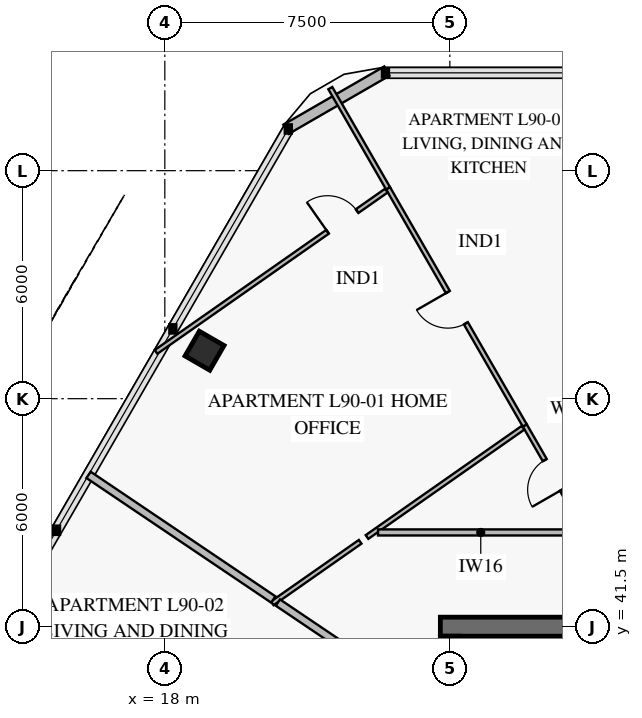
"""IFC4 building model, lengths in metres.
Left out: names, types, materials, properties, quantities, classifications, styles, units other than length and angle.
Written with IfcOpenShell. Run it as: python <this file> out.ifc"""

import sys

from ifc_helpers import new_model, si_unit, direction, frame, frame_2d, origin, origin_2d, place, context, subcontext, project, spatial, rectangle, extrude, element, fill, save


model = new_model("IFC4")
c1 = context("Model", 3, precision=1e-05, world=origin(), true_north=direction((0.0, 1.0)))
c2 = subcontext(c1, "Body", "Model", "MODEL_VIEW")
j1 = project(units=[si_unit("LENGTHUNIT", "METRE"), si_unit("PLANEANGLEUNIT", "RADIAN")], contexts=[c1])
p1 = place(None, origin())
s1 = spatial("IfcSite", under=j1, at=p1, CompositionType="ELEMENT")
p2 = place(p1, origin())
s2 = spatial("IfcBuilding", under=s1, at=p2, CompositionType="ELEMENT")
p3 = place(p2, frame((0.0, 0.0, 353.8)))
s3 = spatial("IfcBuildingStorey", under=s2, at=p3, CompositionType="ELEMENT", Elevation=353.8)
p4 = place(p3, frame((36.75, 41.5, 0.0), z_axis=(0.0, 0.0, 1.0), x_axis=(-1.0, 0.0, 0.0)))
e1 = element("IfcWall", 1, at=p4, inside=s3, PredefinedType="SHEAR", context=c2, shape_type="SweptSolid", body=[
    extrude(rectangle(XDim=11.5, YDim=0.5, at=frame_2d((5.75, 0.0))), origin(), (0.0, 0.0, 1.0), 3.8),
])
p5 = place(p4, frame((4.25, 0.0, 0.0)))
e2 = element("IfcOpeningElement", 2, at=p5, cuts=e1, PredefinedType="OPENING", context=c2, shape_type="SweptSolid", body=[
    extrude(rectangle(XDim=1.1, YDim=2.15, at=frame_2d((0.55, 1.075))), frame((0.0, 0.262, 0.0), z_axis=(0.0, -1.0, 0.0), x_axis=(1.0, 0.0, 0.0)), (0.0, 0.0, 1.0), 0.524),
])
p6 = place(p3, frame((25.5, 22.75, 0.0), z_axis=(0.0, 0.0, 1.0), x_axis=(0.0, 1.0, 0.0)))
e3 = element("IfcWall", 3, at=p6, inside=s3, PredefinedType="SHEAR", context=c2, shape_type="SweptSolid", body=[
    extrude(rectangle(XDim=18.5, YDim=0.5, at=frame_2d((9.25, 0.0))), origin(), (0.0, 0.0, 1.0), 3.8),
])
p7 = place(p6, frame((9.0, 0.0, 0.0)))
e4 = element("IfcOpeningElement", 4, at=p7, cuts=e3, PredefinedType="OPENING", context=c2, shape_type="SweptSolid", body=[
    extrude(rectangle(XDim=1.1, YDim=2.15, at=frame_2d((0.55, 1.075))), frame((0.0, 0.262, 0.0), z_axis=(0.0, -1.0, 0.0), x_axis=(1.0, 0.0, 0.0)), (0.0, 0.0, 1.0), 0.524),
])
p8 = place(p3, frame((19.045, 48.762, 0.0), z_axis=(0.0, 0.0, 1.0), x_axis=(-0.5, -0.866025403784, 0.0)))
e5 = element("IfcColumn", 5, at=p8, inside=s3, PredefinedType="COLUMN", context=c2, shape_type="SweptSolid", body=[
    extrude(rectangle(XDim=0.75, YDim=0.75, at=origin_2d()), origin(), (0.0, 0.0, 1.0), 3.35),
])
p9 = place(p3, frame((21.189, 54.589, 0.0), z_axis=(0.0, 0.0, 1.0), x_axis=(0.866023752521, 0.50000286006, 0.0)))
e6 = element("IfcWall", 6, at=p9, inside=s3, PredefinedType="SOLIDWALL", context=c2, shape_type="SweptSolid", body=[
    extrude(rectangle(XDim=3.065, YDim=0.28, at=frame_2d((1.532, 0.0))), origin(), (0.0, 0.0, 1.0), 3.35),
])
p10 = place(p3, frame((28.766, 44.55, 0.0), z_axis=(0.0, 0.0, 1.0), x_axis=(-0.499380083009, 0.866383017316, 0.0)))
e7 = element("IfcWall", 7, at=p10, inside=s3, PredefinedType="PARTITIONING", context=c2, shape_type="SweptSolid", body=[
    extrude(rectangle(XDim=2.593, YDim=0.12, at=frame_2d((1.296, 0.0))), origin(), (0.0, 0.0, 1.0), 3.35),
])
p11 = place(p10, frame((0.639, 0.0, 0.0)))
e8 = element("IfcOpeningElement", 8, at=p11, cuts=e7, PredefinedType="OPENING", context=c2, shape_type="SweptSolid", body=[
    extrude(rectangle(XDim=0.9, YDim=2.1, at=frame_2d((0.45, 1.05))), frame((0.0, 0.072, 0.0), z_axis=(0.0, -1.0, 0.0), x_axis=(1.0, 0.0, 0.0)), (0.0, 0.0, 1.0), 0.144),
])
p12 = place(p3, frame((27.471, 46.797, 0.0), z_axis=(0.0, 0.0, 1.0), x_axis=(-0.499402562398, 0.866370059888, 0.0)))
e9 = element("IfcWall", 9, at=p12, inside=s3, PredefinedType="PARTITIONING", context=c2, shape_type="SweptSolid", body=[
    extrude(rectangle(XDim=7.202, YDim=0.12, at=frame_2d((3.601, 0.0))), origin(), (0.0, 0.0, 1.0), 2.77),
])
p13 = place(p12, frame((3.101, 0.0, 0.0)))
e10 = element("IfcOpeningElement", 10, at=p13, cuts=e9, PredefinedType="OPENING", context=c2, shape_type="SweptSolid", body=[
    extrude(rectangle(XDim=0.95, YDim=2.1, at=frame_2d((0.475, 1.05))), frame((0.0, 0.072, 0.0), z_axis=(0.0, -1.0, 0.0), x_axis=(1.0, 0.0, 0.0)), (0.0, 0.0, 1.0), 0.144),
])
p14 = place(p3, frame((23.831, 52.976, 0.0), z_axis=(0.0, 0.0, 1.0), x_axis=(-0.819148211634, -0.573581909911, 0.0)))
e11 = element("IfcWall", 11, at=p14, inside=s3, PredefinedType="PARTITIONING", context=c2, shape_type="SweptSolid", body=[
    extrude(rectangle(XDim=7.4, YDim=0.12, at=frame_2d((3.7, 0.0))), origin(), (0.0, 0.0, 1.0), 2.922),
])
p15 = place(p14, frame((0.94, 0.0, 0.0)))
e12 = element("IfcOpeningElement", 12, at=p15, cuts=e11, PredefinedType="OPENING", context=c2, shape_type="SweptSolid", body=[
    extrude(rectangle(XDim=0.95, YDim=2.1, at=frame_2d((0.475, 1.05))), frame((0.0, 0.072, 0.0), z_axis=(0.0, -1.0, 0.0), x_axis=(1.0, 0.0, 0.0)), (0.0, 0.0, 1.0), 0.144),
])
p16 = place(p3, frame((23.874, 53.037, 0.0), z_axis=(0.0, 0.0, 1.0), x_axis=(-0.499419092817, 0.866360531032, 0.0)))
e13 = element("IfcWall", 13, at=p16, inside=s3, PredefinedType="PARTITIONING", context=c2, shape_type="SweptSolid", body=[
    extrude(rectangle(XDim=3.042, YDim=0.12, at=frame_2d((1.521, 0.0))), origin(), (0.0, 0.0, 1.0), 3.35),
])
p17 = place(p3, frame((27.427, 46.736, 0.0), z_axis=(0.0, 0.0, 1.0), x_axis=(-0.819165574648, -0.573557112511, 0.0)))
e14 = element("IfcWall", 14, at=p17, inside=s3, PredefinedType="PARTITIONING", context=c2, shape_type="SweptSolid", body=[
    extrude(rectangle(XDim=5.014, YDim=0.12, at=frame_2d((2.507, 0.0))), origin(), (0.0, 0.0, 1.0), 2.8),
])
p18 = place(p3, frame((23.14, 43.734, 0.0), z_axis=(0.0, 0.0, 1.0), x_axis=(-0.819170990497, -0.57354937741, 0.0)))
e15 = element("IfcWall", 15, at=p18, inside=s3, PredefinedType="PARTITIONING", context=c2, shape_type="SweptSolid", body=[
    extrude(rectangle(XDim=2.824, YDim=0.12, at=frame_2d((1.412, 0.0))), origin(), (0.0, 0.0, 1.0), 3.0),
])
p19 = place(p3, frame((23.056, 40.731, 0.0), z_axis=(0.0, 0.0, 1.0), x_axis=(-0.829030181168, 0.559203861497, 0.0)))
e16 = element("IfcWall", 16, at=p19, inside=s3, PredefinedType="PARTITIONING", context=c2, shape_type="SweptSolid", body=[
    extrude(rectangle(XDim=2.51, YDim=0.2, at=frame_2d((1.255, 0.0))), origin(), (0.0, 0.0, 1.0), 3.35),
])
p20 = place(p3, frame((20.854, 42.216, 0.0), z_axis=(0.0, 0.0, 1.0), x_axis=(-0.829040257145, 0.559188923382, 0.0)))
e17 = element("IfcWall", 17, at=p20, inside=s3, PredefinedType="PARTITIONING", context=c2, shape_type="SweptSolid", body=[
    extrude(rectangle(XDim=5.864, YDim=0.2, at=frame_2d((2.932, 0.0))), origin(), (0.0, 0.0, 1.0), 2.77),
])
p21 = place(p3, frame((29.016, 43.98, 0.0), z_axis=(0.0, 0.0, 1.0), x_axis=(-1.0, 0.0, 0.0)))
e18 = element("IfcWall", 18, at=p21, inside=s3, PredefinedType="PARTITIONING", context=c2, shape_type="SweptSolid", body=[
    extrude(rectangle(XDim=5.406, YDim=0.16, at=frame_2d((2.703, 0.0))), origin(), (0.0, 0.0, 1.0), 2.8),
])
p22 = place(p11, origin())
e19 = element("IfcDoor", 19, at=p22, inside=s3, OperationType="SINGLE_SWING_LEFT", PredefinedType="DOOR", context=c2, shape_type="SweptSolid", body=[
    extrude(rectangle(XDim=0.9, YDim=2.1, at=frame_2d((0.45, 1.05))), frame((0.0, 0.025, 0.0), z_axis=(0.0, -1.0, 0.0), x_axis=(1.0, 0.0, 0.0)), (0.0, 0.0, 1.0), 0.05),
])
fill(e8, e19)
p23 = place(p13, origin())
e20 = element("IfcDoor", 20, at=p23, inside=s3, OperationType="SINGLE_SWING_RIGHT", PredefinedType="DOOR", context=c2, shape_type="SweptSolid", body=[
    extrude(rectangle(XDim=0.95, YDim=2.1, at=frame_2d((0.475, 1.05))), frame((0.0, 0.025, 0.0), z_axis=(0.0, -1.0, 0.0), x_axis=(1.0, 0.0, 0.0)), (0.0, 0.0, 1.0), 0.05),
])
fill(e10, e20)
p24 = place(p15, frame((0.95, 0.0, 0.0), z_axis=(0.0, 0.0, 1.0), x_axis=(-1.0, 0.0, 0.0)))
e21 = element("IfcDoor", 21, at=p24, inside=s3, OperationType="SINGLE_SWING_LEFT", PredefinedType="DOOR", context=c2, shape_type="SweptSolid", body=[
    extrude(rectangle(XDim=0.95, YDim=2.1, at=frame_2d((0.475, 1.05))), frame((0.0, 0.025, 0.0), z_axis=(0.0, -1.0, 0.0), x_axis=(1.0, 0.0, 0.0)), (0.0, 0.0, 1.0), 0.05),
])
fill(e12, e21)
save(model, sys.argv[1])
